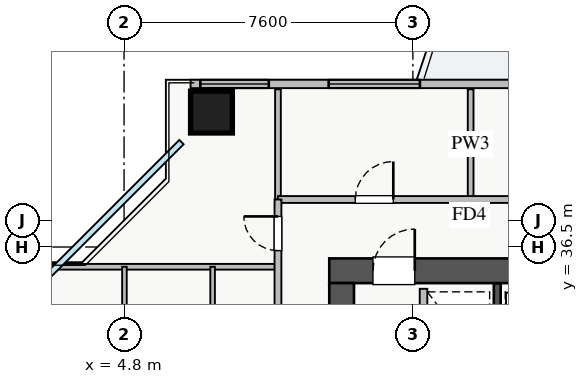
"""IFC4 building model, lengths in metres.
Left out: names, types, materials, properties, quantities, classifications, styles, units other than length and angle.
Written with IfcOpenShell. Run it as: python <this file> out.ifc"""

import sys

from ifc_helpers import new_model, si_unit, direction, frame, frame_2d, origin, origin_2d, place, context, subcontext, project, spatial, rectangle, extrude, source, transform, mapped, element, fill, save


model = new_model("IFC4")
c1 = context("Model", 3, precision=1e-05, world=origin(), true_north=direction((0.0, 1.0)))
c2 = subcontext(c1, "Body", "Model", "MODEL_VIEW")
j1 = project(units=[si_unit("LENGTHUNIT", "METRE"), si_unit("PLANEANGLEUNIT", "RADIAN")], contexts=[c1])
p1 = place(None, origin())
s1 = spatial("IfcSite", under=j1, at=p1, CompositionType="ELEMENT")
p2 = place(p1, origin())
s2 = spatial("IfcBuilding", under=s1, at=p2, CompositionType="ELEMENT")
p3 = place(p2, frame((0.0, 0.0, 113.25)))
s3 = spatial("IfcBuildingStorey", under=s2, at=p3, CompositionType="ELEMENT", Elevation=113.25)
p4 = place(p3, frame((14.62, 33.2, 0.0), z_axis=(0.0, 0.0, 1.0), x_axis=(0.0, 1.0, 0.0)))
e1 = element("IfcWall", 1, at=p4, inside=s3, PredefinedType="SHEAR", context=c2, shape_type="SweptSolid", body=[
    extrude(rectangle(XDim=2.35, YDim=0.18, at=frame_2d((1.175, 0.0))), origin(), (0.0, 0.0, 1.0), 3.07),
])
p5 = place(p3, frame((10.2, 35.875, 0.0), z_axis=(0.0, 0.0, 1.0), x_axis=(1.0, 0.0, 0.0)))
e2 = element("IfcWall", 2, at=p5, inside=s3, PredefinedType="SHEAR", context=c2, shape_type="SweptSolid", body=[
    extrude(rectangle(XDim=17.6, YDim=0.65, at=frame_2d((8.8, 0.0))), origin(), (0.0, 0.0, 1.0), 3.25),
])
p6 = place(p5, frame((1.15, 0.0, 0.0)))
e3 = element("IfcOpeningElement", 3, at=p6, cuts=e2, PredefinedType="OPENING", context=c2, shape_type="SweptSolid", body=[
    extrude(rectangle(XDim=1.1, YDim=2.05, at=frame_2d((0.55, 1.025))), frame((0.0, 0.335, 0.0), z_axis=(0.0, -1.0, 0.0), x_axis=(1.0, 0.0, 0.0)), (0.0, 0.0, 1.0), 0.67),
])
p7 = place(p5, frame((8.3, 0.0, 0.0)))
e4 = element("IfcOpeningElement", 4, at=p7, cuts=e2, PredefinedType="OPENING", context=c2, shape_type="SweptSolid", body=[
    extrude(rectangle(XDim=1.1, YDim=2.05, at=frame_2d((0.55, 1.025))), frame((0.0, 0.335, 0.0), z_axis=(0.0, -1.0, 0.0), x_axis=(1.0, 0.0, 0.0)), (0.0, 0.0, 1.0), 0.67),
])
p8 = place(p5, frame((4.9, 0.0, 0.0)))
e5 = element("IfcOpeningElement", 5, at=p8, cuts=e2, PredefinedType="OPENING", context=c2, shape_type="SweptSolid", body=[
    extrude(rectangle(XDim=1.1, YDim=2.05, at=frame_2d((0.55, 1.025))), frame((0.0, 0.335, 0.0), z_axis=(0.0, -1.0, 0.0), x_axis=(1.0, 0.0, 0.0)), (0.0, 0.0, 1.0), 0.67),
])
p9 = place(p5, frame((14.74, 0.0, 0.0)))
e6 = element("IfcOpeningElement", 6, at=p9, cuts=e2, PredefinedType="OPENING", context=c2, shape_type="SweptSolid", body=[
    extrude(rectangle(XDim=1.0, YDim=2.05, at=frame_2d((0.5, 1.025))), frame((0.0, 0.335, 0.0), z_axis=(0.0, -1.0, 0.0), x_axis=(1.0, 0.0, 0.0)), (0.0, 0.0, 1.0), 0.67),
])
p10 = place(p5, frame((10.005, 0.0, 0.0)))
e7 = element("IfcOpeningElement", 7, at=p10, cuts=e2, PredefinedType="OPENING", context=c2, shape_type="SweptSolid", body=[
    extrude(rectangle(XDim=1.0, YDim=2.05, at=frame_2d((0.5, 1.025))), frame((0.0, 0.335, 0.0), z_axis=(0.0, -1.0, 0.0), x_axis=(1.0, 0.0, 0.0)), (0.0, 0.0, 1.0), 0.67),
])
p11 = place(p5, frame((11.55, 0.0, 0.0)))
e8 = element("IfcOpeningElement", 8, at=p11, cuts=e2, PredefinedType="OPENING", context=c2, shape_type="SweptSolid", body=[
    extrude(rectangle(XDim=1.0, YDim=2.05, at=frame_2d((0.5, 1.025))), frame((0.0, 0.335, 0.0), z_axis=(0.0, -1.0, 0.0), x_axis=(1.0, 0.0, 0.0)), (0.0, 0.0, 1.0), 0.67),
])
p12 = place(p5, frame((13.215, 0.0, 0.0)))
e9 = element("IfcOpeningElement", 9, at=p12, cuts=e2, PredefinedType="OPENING", context=c2, shape_type="SweptSolid", body=[
    extrude(rectangle(XDim=1.0, YDim=2.05, at=frame_2d((0.5, 1.025))), frame((0.0, 0.335, 0.0), z_axis=(0.0, -1.0, 0.0), x_axis=(1.0, 0.0, 0.0)), (0.0, 0.0, 1.0), 0.67),
])
p13 = place(p3, frame((10.525, 29.65, 0.0), z_axis=(0.0, 0.0, 1.0), x_axis=(0.0, 1.0, 0.0)))
e10 = element("IfcWall", 10, at=p13, inside=s3, PredefinedType="SHEAR", context=c2, shape_type="SweptSolid", body=[
    extrude(rectangle(XDim=5.9, YDim=0.65, at=frame_2d((2.95, 0.0))), origin(), (0.0, 0.0, 1.0), 3.25),
])
m1 = source(origin(), c2, "Body", "SweptSolid", [
    extrude(rectangle(XDim=1.1, YDim=1.1, at=origin_2d()), origin(), (0.0, 0.0, 1.0), 3.25),
])
p14 = place(p3, frame((7.1, 40.05, 0.0), z_axis=(0.0, 0.0, 1.0), x_axis=(1.0, 0.0, 0.0)))
e11 = element("IfcColumn", 11, at=p14, inside=s3, PredefinedType="COLUMN", context=c2, shape_type="MappedRepresentation", body=[
    mapped(m1, transform((0.0, 0.0, 0.0), x_axis=(1.0, 0.0, 0.0), y_axis=(0.0, 1.0, 0.0), z_axis=(0.0, 0.0, 1.0), scale=1.0)),
])
p15 = place(p3, frame((6.55, 40.79, 0.0), z_axis=(0.0, 0.0, 1.0), x_axis=(1.0, 0.0, 0.0)))
e12 = element("IfcWall", 12, at=p15, inside=s3, PredefinedType="STANDARD", context=c2, shape_type="SweptSolid", body=[
    extrude(rectangle(XDim=24.9, YDim=0.22, at=frame_2d((12.45, 0.0))), origin(), (0.0, 0.0, 1.0), 2.61),
])
p16 = place(p15, frame((13.3, 0.0, 0.0)))
e13 = element("IfcOpeningElement", 13, at=p16, cuts=e12, PredefinedType="OPENING", context=c2, shape_type="SweptSolid", body=[
    extrude(rectangle(XDim=1.2, YDim=2.1, at=frame_2d((0.6, 1.05))), frame((0.0, 0.12, 0.0), z_axis=(0.0, -1.0, 0.0), x_axis=(1.0, 0.0, 0.0)), (0.0, 0.0, 1.0), 0.24),
])
p17 = place(p15, frame((3.635, 0.0, 0.9)))
e14 = element("IfcOpeningElement", 14, at=p17, cuts=e12, PredefinedType="OPENING", context=c2, shape_type="SweptSolid", body=[
    extrude(rectangle(XDim=2.4, YDim=1.5, at=frame_2d((1.2, 0.75))), frame((0.0, 0.12, 0.0), z_axis=(0.0, -1.0, 0.0), x_axis=(1.0, 0.0, 0.0)), (0.0, 0.0, 1.0), 0.24),
])
p18 = place(p15, frame((8.438, 0.0, 0.9)))
e15 = element("IfcOpeningElement", 15, at=p18, cuts=e12, PredefinedType="OPENING", context=c2, shape_type="SweptSolid", body=[
    extrude(rectangle(XDim=1.8, YDim=1.45, at=frame_2d((0.9, 0.725))), frame((0.0, 0.12, 0.0), z_axis=(0.0, -1.0, 0.0), x_axis=(1.0, 0.0, 0.0)), (0.0, 0.0, 1.0), 0.24),
])
p19 = place(p15, frame((14.813, 0.0, 0.9)))
e16 = element("IfcOpeningElement", 16, at=p19, cuts=e12, PredefinedType="OPENING", context=c2, shape_type="SweptSolid", body=[
    extrude(rectangle(XDim=1.5, YDim=1.45, at=frame_2d((0.75, 0.725))), frame((0.0, 0.12, 0.0), z_axis=(0.0, -1.0, 0.0), x_axis=(1.0, 0.0, 0.0)), (0.0, 0.0, 1.0), 0.24),
])
p20 = place(p15, frame((20.738, 0.0, 0.9)))
e17 = element("IfcOpeningElement", 17, at=p20, cuts=e12, PredefinedType="OPENING", context=c2, shape_type="SweptSolid", body=[
    extrude(rectangle(XDim=2.1, YDim=1.48, at=frame_2d((1.05, 0.74))), frame((0.0, 0.12, 0.0), z_axis=(0.0, -1.0, 0.0), x_axis=(1.0, 0.0, 0.0)), (0.0, 0.0, 1.0), 0.24),
])
p21 = place(p15, frame((0.258, 0.0, 0.9)))
e18 = element("IfcOpeningElement", 18, at=p21, cuts=e12, PredefinedType="OPENING", context=c2, shape_type="SweptSolid", body=[
    extrude(rectangle(XDim=1.8, YDim=1.5, at=frame_2d((0.9, 0.75))), frame((0.0, 0.12, 0.0), z_axis=(0.0, -1.0, 0.0), x_axis=(1.0, 0.0, 0.0)), (0.0, 0.0, 1.0), 0.24),
])
p22 = place(p3, frame((12.68, 33.19, 0.0), z_axis=(0.0, 0.0, 1.0), x_axis=(0.0, 1.0, 0.0)))
e19 = element("IfcWall", 19, at=p22, inside=s3, PredefinedType="PARTITIONING", context=c2, shape_type="SweptSolid", body=[
    extrude(rectangle(XDim=2.21, YDim=0.2, at=frame_2d((1.105, 0.0))), origin(), (0.0, 0.0, 1.0), 3.07),
])
for number, where, z_axis, x_axis in (
    (20, (13.92, 37.75, 0.0), (0.0, 0.0, 1.0), (0.0, 1.0, 0.0)),
    (21, (8.85, 37.75, 0.0), (0.0, 0.0, 1.0), (0.0, 1.0, 0.0)),
):
    element("IfcWall", number, at=place(p3, frame(where, z_axis=z_axis, x_axis=x_axis)), inside=s3, PredefinedType="PARTITIONING", context=c2, shape_type="SweptSolid", body=[
        extrude(rectangle(XDim=2.9, YDim=0.15, at=frame_2d((1.45, 0.0))), origin(), (0.0, 0.0, 1.0), 3.07),
    ])
p23 = place(p3, frame((8.85, 37.75, 0.0), z_axis=(0.0, 0.0, 1.0), x_axis=(1.0, 0.0, 0.0)))
e22 = element("IfcWall", 22, at=p23, inside=s3, PredefinedType="PARTITIONING", context=c2, shape_type="SweptSolid", body=[
    extrude(rectangle(XDim=23.57, YDim=0.18, at=frame_2d((11.785, 0.0))), origin(), (0.0, 0.0, 1.0), 3.07),
])
p24 = place(p23, frame((2.035, 0.0, 0.0)))
e23 = element("IfcOpeningElement", 23, at=p24, cuts=e22, PredefinedType="OPENING", context=c2, shape_type="SweptSolid", body=[
    extrude(rectangle(XDim=1.0, YDim=2.05, at=frame_2d((0.5, 1.025))), frame((0.0, 0.1, 0.0), z_axis=(0.0, -1.0, 0.0), x_axis=(1.0, 0.0, 0.0)), (0.0, 0.0, 1.0), 0.2),
])
p25 = place(p23, frame((7.16, 0.0, 0.0)))
e24 = element("IfcOpeningElement", 24, at=p25, cuts=e22, PredefinedType="OPENING", context=c2, shape_type="SweptSolid", body=[
    extrude(rectangle(XDim=1.0, YDim=2.05, at=frame_2d((0.5, 1.025))), frame((0.0, 0.1, 0.0), z_axis=(0.0, -1.0, 0.0), x_axis=(1.0, 0.0, 0.0)), (0.0, 0.0, 1.0), 0.2),
])
p26 = place(p23, frame((13.3, 0.0, 0.0)))
e25 = element("IfcOpeningElement", 25, at=p26, cuts=e22, PredefinedType="OPENING", context=c2, shape_type="SweptSolid", body=[
    extrude(rectangle(XDim=1.0, YDim=2.05, at=frame_2d((0.5, 1.025))), frame((0.0, 0.1, 0.0), z_axis=(0.0, -1.0, 0.0), x_axis=(1.0, 0.0, 0.0)), (0.0, 0.0, 1.0), 0.2),
])
p27 = place(p23, frame((19.74, 0.0, 0.0)))
e26 = element("IfcOpeningElement", 26, at=p27, cuts=e22, PredefinedType="OPENING", context=c2, shape_type="SweptSolid", body=[
    extrude(rectangle(XDim=1.0, YDim=2.05, at=frame_2d((0.5, 1.025))), frame((0.0, 0.1, 0.0), z_axis=(0.0, -1.0, 0.0), x_axis=(1.0, 0.0, 0.0)), (0.0, 0.0, 1.0), 0.2),
])
p28 = place(p3, frame((1.35, 35.98, 0.0), z_axis=(0.0, 0.0, 1.0), x_axis=(1.0, 0.0, 0.0)))
e27 = element("IfcWall", 27, at=p28, inside=s3, PredefinedType="PARTITIONING", context=c2, shape_type="SweptSolid", body=[
    extrude(rectangle(XDim=7.5, YDim=0.15, at=frame_2d((3.75, 0.0))), origin(), (0.0, 0.0, 1.0), 3.07),
])
p29 = place(p3, frame((4.81, 28.89, 0.0), z_axis=(0.0, 0.0, 1.0), x_axis=(0.0, 1.0, 0.0)))
e28 = element("IfcWall", 28, at=p29, inside=s3, PredefinedType="PLUMBINGWALL", context=c2, shape_type="SweptSolid", body=[
    extrude(rectangle(XDim=7.09, YDim=0.12, at=frame_2d((3.545, 0.0))), origin(), (0.0, 0.0, 1.0), 3.07),
])
p30 = place(p3, frame((7.13, 28.89, 0.0), z_axis=(0.0, 0.0, 1.0), x_axis=(0.0, 1.0, 0.0)))
e29 = element("IfcWall", 29, at=p30, inside=s3, PredefinedType="PLUMBINGWALL", context=c2, shape_type="SweptSolid", body=[
    extrude(rectangle(XDim=7.09, YDim=0.12, at=frame_2d((3.545, 0.0))), origin(), (0.0, 0.0, 1.0), 2.577),
])
p31 = place(p3, frame((8.85, 8.25, 0.0), z_axis=(0.0, 0.0, 1.0), x_axis=(0.0, 1.0, 0.0)))
e30 = element("IfcWall", 30, at=p31, inside=s3, PredefinedType="PARTITIONING", context=c2, shape_type="SweptSolid", body=[
    extrude(rectangle(XDim=29.5, YDim=0.18, at=frame_2d((14.75, 0.0))), origin(), (0.0, 0.0, 1.0), 3.07),
])
p32 = place(p31, frame((28.155, 0.0, 0.0)))
e31 = element("IfcOpeningElement", 31, at=p32, cuts=e30, PredefinedType="OPENING", context=c2, shape_type="SweptSolid", body=[
    extrude(rectangle(XDim=0.9, YDim=2.05, at=frame_2d((0.45, 1.025))), frame((0.0, 0.1, 0.0), z_axis=(0.0, -1.0, 0.0), x_axis=(1.0, 0.0, 0.0)), (0.0, 0.0, 1.0), 0.2),
])
p33 = place(p31, frame((0.27, 0.0, 0.0)))
e32 = element("IfcOpeningElement", 32, at=p33, cuts=e30, PredefinedType="OPENING", context=c2, shape_type="SweptSolid", body=[
    extrude(rectangle(XDim=0.9, YDim=2.05, at=frame_2d((0.45, 1.025))), frame((0.0, 0.1, 0.0), z_axis=(0.0, -1.0, 0.0), x_axis=(1.0, 0.0, 0.0)), (0.0, 0.0, 1.0), 0.2),
])
p34 = place(p31, frame((7.255, 0.0, 0.0)))
e33 = element("IfcOpeningElement", 33, at=p34, cuts=e30, PredefinedType="OPENING", context=c2, shape_type="SweptSolid", body=[
    extrude(rectangle(XDim=1.0, YDim=2.05, at=frame_2d((0.5, 1.025))), frame((0.0, 0.1, 0.0), z_axis=(0.0, -1.0, 0.0), x_axis=(1.0, 0.0, 0.0)), (0.0, 0.0, 1.0), 0.2),
])
p35 = place(p31, frame((16.675, 0.0, 0.0)))
e34 = element("IfcOpeningElement", 34, at=p35, cuts=e30, PredefinedType="OPENING", context=c2, shape_type="SweptSolid", body=[
    extrude(rectangle(XDim=1.0, YDim=2.05, at=frame_2d((0.5, 1.025))), frame((0.0, 0.1, 0.0), z_axis=(0.0, -1.0, 0.0), x_axis=(1.0, 0.0, 0.0)), (0.0, 0.0, 1.0), 0.2),
])
m2 = source(origin(), c2, "Body", "SweptSolid", [
    extrude(rectangle(XDim=2.4, YDim=1.5, at=frame_2d((1.2, 0.75))), frame((0.0, 0.03, 0.0), z_axis=(0.0, -1.0, 0.0), x_axis=(1.0, 0.0, 0.0)), (0.0, 0.0, 1.0), 0.06),
])
p36 = place(p17, origin())
e35 = element("IfcWindow", 35, at=p36, inside=s3, PartitioningType="TRIPLE_PANEL_VERTICAL", PredefinedType="WINDOW", context=c2, shape_type="MappedRepresentation", body=[
    mapped(m2, transform((0.0, 0.0, 0.0), x_axis=(1.0, 0.0, 0.0), y_axis=(0.0, 1.0, 0.0), z_axis=(0.0, 0.0, 1.0), scale=1.0)),
])
fill(e14, e35)
m3 = source(origin(), c2, "Body", "SweptSolid", [
    extrude(rectangle(XDim=1.1, YDim=2.05, at=frame_2d((0.55, 1.025))), frame((0.0, 0.025, 0.0), z_axis=(0.0, -1.0, 0.0), x_axis=(1.0, 0.0, 0.0)), (0.0, 0.0, 1.0), 0.05),
])
p37 = place(p6, origin())
e36 = element("IfcDoor", 36, at=p37, inside=s3, OperationType="SINGLE_SWING_RIGHT", PredefinedType="DOOR", context=c2, shape_type="MappedRepresentation", body=[
    mapped(m3, transform((0.0, 0.0, 0.0), x_axis=(1.0, 0.0, 0.0), y_axis=(0.0, 1.0, 0.0), z_axis=(0.0, 0.0, 1.0), scale=1.0)),
])
fill(e3, e36)
m4 = source(origin(), c2, "Body", "SweptSolid", [
    extrude(rectangle(XDim=1.0, YDim=2.05, at=frame_2d((0.5, 1.025))), frame((0.0, 0.025, 0.0), z_axis=(0.0, -1.0, 0.0), x_axis=(1.0, 0.0, 0.0)), (0.0, 0.0, 1.0), 0.05),
])
p38 = place(p24, origin())
e37 = element("IfcDoor", 37, at=p38, inside=s3, OperationType="SINGLE_SWING_RIGHT", PredefinedType="DOOR", context=c2, shape_type="MappedRepresentation", body=[
    mapped(m4, transform((0.0, 0.0, 0.0), x_axis=(1.0, 0.0, 0.0), y_axis=(0.0, 1.0, 0.0), z_axis=(0.0, 0.0, 1.0), scale=1.0)),
])
fill(e23, e37)
m5 = source(origin(), c2, "Body", "SweptSolid", [
    extrude(rectangle(XDim=0.9, YDim=2.05, at=frame_2d((0.45, 1.025))), frame((0.0, 0.025, 0.0), z_axis=(0.0, -1.0, 0.0), x_axis=(1.0, 0.0, 0.0)), (0.0, 0.0, 1.0), 0.05),
])
p39 = place(p32, origin())
e38 = element("IfcDoor", 38, at=p39, inside=s3, OperationType="SINGLE_SWING_RIGHT", PredefinedType="DOOR", context=c2, shape_type="MappedRepresentation", body=[
    mapped(m5, transform((0.0, 0.0, 0.0), x_axis=(1.0, 0.0, 0.0), y_axis=(0.0, 1.0, 0.0), z_axis=(0.0, 0.0, 1.0), scale=1.0)),
])
fill(e31, e38)
m6 = source(origin(), c2, "Body", "SweptSolid", [
    extrude(rectangle(XDim=1.8, YDim=1.5, at=frame_2d((0.9, 0.75))), frame((0.0, 0.03, 0.0), z_axis=(0.0, -1.0, 0.0), x_axis=(1.0, 0.0, 0.0)), (0.0, 0.0, 1.0), 0.06),
])
p40 = place(p21, origin())
e39 = element("IfcWindow", 39, at=p40, inside=s3, PartitioningType="DOUBLE_PANEL_VERTICAL", PredefinedType="WINDOW", context=c2, shape_type="MappedRepresentation", body=[
    mapped(m6, transform((0.0, 0.0, 0.0), x_axis=(1.0, 0.0, 0.0), y_axis=(0.0, 1.0, 0.0), z_axis=(0.0, 0.0, 1.0), scale=1.0)),
])
fill(e18, e39)
save(model, sys.argv[1])
